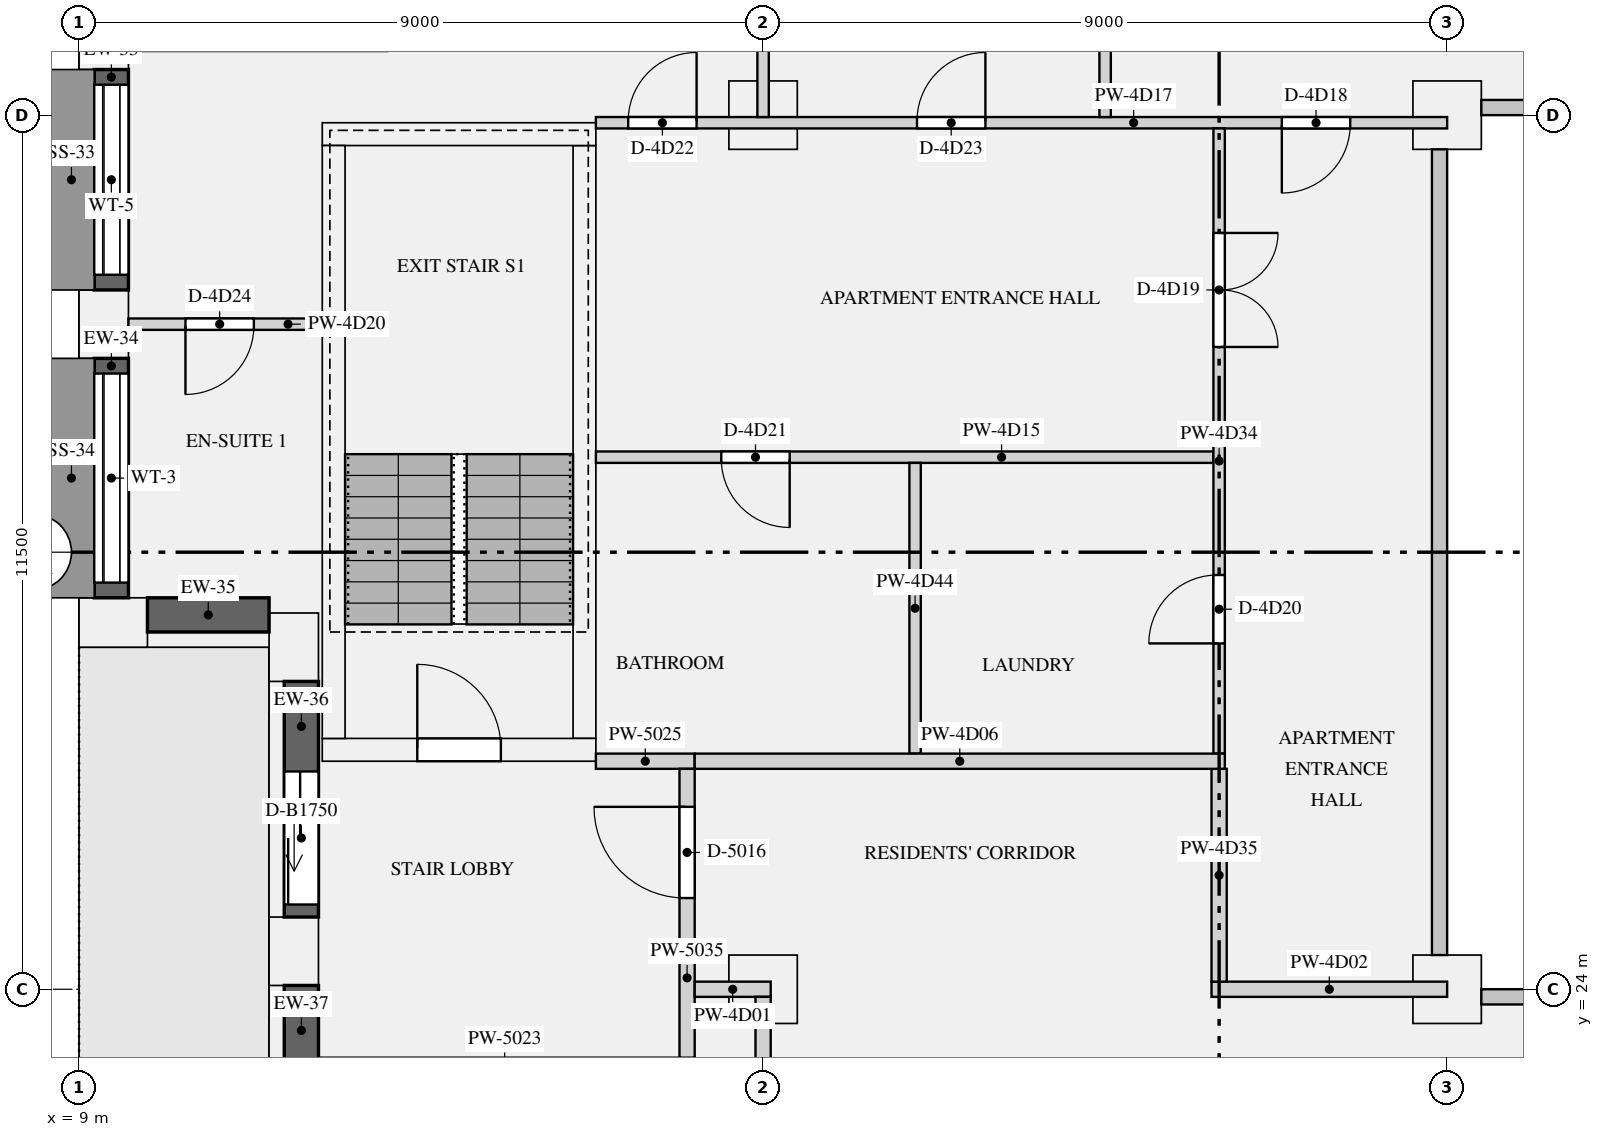
"""IFC4 building model, lengths in metres.
Left out: names, types, materials, properties, quantities, classifications, styles, units other than length and angle.
Written with IfcOpenShell. Run it as: python <this file> out.ifc"""

import sys

from ifc_helpers import new_model, si_unit, direction, frame, frame_2d, origin, origin_2d, place, context, subcontext, project, spatial, rectangle, extrude, element, fill, save


model = new_model("IFC4")
c1 = context("Model", 3, precision=1e-05, world=origin(), true_north=direction((0.0, 1.0)))
c2 = subcontext(c1, "Body", "Model", "MODEL_VIEW")
j1 = project(units=[si_unit("LENGTHUNIT", "METRE"), si_unit("PLANEANGLEUNIT", "RADIAN")], contexts=[c1])
p1 = place(None, origin())
s1 = spatial("IfcSite", under=j1, at=p1, CompositionType="ELEMENT")
p2 = place(p1, origin())
s2 = spatial("IfcBuilding", under=s1, at=p2, CompositionType="ELEMENT")
p3 = place(p2, frame((0.0, 0.0, 223.2)))
s3 = spatial("IfcBuildingStorey", under=s2, at=p3, CompositionType="ELEMENT", Elevation=223.2)
for number, where, z_axis, x_axis in (
    (1, (9.325, 36.55, 0.0), (0.0, 0.0, 1.0), (0.0, -1.0, 0.0)),
    (2, (9.325, 32.75, 0.0), (0.0, 0.0, 1.0), (0.0, -1.0, 0.0)),
    (3, (9.45, 28.825, 0.0), (0.0, 0.0, 1.0), (1.0, 0.0, 0.0)),
    (4, (11.825, 28.5, 0.0), (0.0, 0.0, 1.0), (0.0, -1.0, 0.0)),
    (5, (11.825, 24.5, 0.0), (0.0, 0.0, 1.0), (0.0, -1.0, 0.0)),
):
    element("IfcColumn", number, at=place(p3, frame(where, z_axis=z_axis, x_axis=x_axis)), inside=s3, PredefinedType="USERDEFINED", context=c2, shape_type="SweptSolid", body=[
        extrude(rectangle(XDim=0.9, YDim=0.65, at=origin_2d()), origin(), (0.0, 0.0, 1.0), 3.15),
    ])
for number, where, z_axis, x_axis in (
    (6, (18.0, 24.0, 0.0), (0.0, 0.0, 1.0), (1.0, 0.0, 0.0)),
    (7, (27.0, 24.0, 0.0), (0.0, 0.0, 1.0), (1.0, 0.0, 0.0)),
    (8, (18.0, 35.5, 0.0), (0.0, 0.0, 1.0), (1.0, 0.0, 0.0)),
    (9, (27.0, 35.5, 0.0), (0.0, 0.0, 1.0), (1.0, 0.0, 0.0)),
):
    element("IfcColumn", number, at=place(p3, frame(where, z_axis=z_axis, x_axis=x_axis)), inside=s3, PredefinedType="COLUMN", context=c2, shape_type="SweptSolid", body=[
        extrude(rectangle(XDim=0.9, YDim=0.9, at=origin_2d()), origin(), (0.0, 0.0, 1.0), 3.15),
    ])
p4 = place(p3, frame((12.2, 27.15, 0.0), z_axis=(0.0, 0.0, 1.0), x_axis=(1.0, 0.0, 0.0)))
e10 = element("IfcWall", 10, at=p4, inside=s3, PredefinedType="SHEAR", context=c2, shape_type="SweptSolid", body=[
    extrude(rectangle(XDim=3.6, YDim=0.3, at=frame_2d((1.8, 0.0))), origin(), (0.0, 0.0, 1.0), 3.15),
])
p5 = place(p4, frame((1.25, 0.0, 0.0)))
e11 = element("IfcOpeningElement", 11, at=p5, cuts=e10, PredefinedType="OPENING", context=c2, shape_type="SweptSolid", body=[
    extrude(rectangle(XDim=1.1, YDim=2.1, at=frame_2d((0.55, 1.05))), frame((0.0, 0.16, 0.0), z_axis=(0.0, -1.0, 0.0), x_axis=(1.0, 0.0, 0.0)), (0.0, 0.0, 1.0), 0.32),
])
p6 = place(p3, frame((12.2, 35.25, 0.0), z_axis=(0.0, 0.0, 1.0), x_axis=(1.0, 0.0, 0.0)))
e12 = element("IfcWall", 12, at=p6, inside=s3, PredefinedType="SHEAR", context=c2, shape_type="SweptSolid", body=[
    extrude(rectangle(XDim=3.6, YDim=0.3, at=frame_2d((1.8, 0.0))), origin(), (0.0, 0.0, 1.0), 3.15),
])
for number, where, z_axis, x_axis in (
    (13, (12.35, 27.3, 0.0), (0.0, 0.0, 1.0), (0.0, 1.0, 0.0)),
    (14, (15.65, 27.3, 0.0), (0.0, 0.0, 1.0), (0.0, 1.0, 0.0)),
):
    element("IfcWall", number, at=place(p3, frame(where, z_axis=z_axis, x_axis=x_axis)), inside=s3, PredefinedType="SHEAR", context=c2, shape_type="SweptSolid", body=[
        extrude(rectangle(XDim=7.8, YDim=0.3, at=frame_2d((3.9, 0.0))), origin(), (0.0, 0.0, 1.0), 3.15),
    ])
p7 = place(p3, frame((9.425, 36.1, 0.9), z_axis=(0.0, 0.0, 1.0), x_axis=(0.0, -1.0, 0.0)))
e15 = element("IfcWall", 15, at=p7, inside=s3, PredefinedType="SOLIDWALL", context=c2, shape_type="SweptSolid", body=[
    extrude(rectangle(XDim=2.9, YDim=0.45, at=frame_2d((1.45, 0.0))), origin(), (0.0, 0.0, 1.0), 1.93),
])
p8 = place(p7, frame((0.2, 0.0, 0.15)))
e16 = element("IfcOpeningElement", 16, at=p8, cuts=e15, PredefinedType="OPENING", context=c2, shape_type="SweptSolid", body=[
    extrude(rectangle(XDim=2.5, YDim=1.5, at=frame_2d((1.25, 0.75))), frame((0.0, 0.235, 0.0), z_axis=(0.0, -1.0, 0.0), x_axis=(1.0, 0.0, 0.0)), (0.0, 0.0, 1.0), 0.47),
])
p9 = place(p3, frame((9.425, 32.3, 0.9), z_axis=(0.0, 0.0, 1.0), x_axis=(0.0, -1.0, 0.0)))
e17 = element("IfcWall", 17, at=p9, inside=s3, PredefinedType="SOLIDWALL", context=c2, shape_type="SweptSolid", body=[
    extrude(rectangle(XDim=3.15, YDim=0.45, at=frame_2d((1.575, 0.0))), origin(), (0.0, 0.0, 1.0), 1.93),
])
p10 = place(p9, frame((0.2, 0.0, 0.15)))
e18 = element("IfcOpeningElement", 18, at=p10, cuts=e17, PredefinedType="OPENING", context=c2, shape_type="SweptSolid", body=[
    extrude(rectangle(XDim=2.75, YDim=1.5, at=frame_2d((1.375, 0.75))), frame((0.0, 0.235, 0.0), z_axis=(0.0, -1.0, 0.0), x_axis=(1.0, 0.0, 0.0)), (0.0, 0.0, 1.0), 0.47),
])
p11 = place(p3, frame((9.9, 28.925, 0.9), z_axis=(0.0, 0.0, 1.0), x_axis=(1.0, 0.0, 0.0)))
e19 = element("IfcWall", 19, at=p11, inside=s3, PredefinedType="SOLIDWALL", context=c2, shape_type="SweptSolid", body=[
    extrude(rectangle(XDim=1.6, YDim=0.45, at=frame_2d((0.8, 0.0))), origin(), (0.0, 0.0, 1.0), 1.93),
])
p12 = place(p3, frame((11.925, 28.05, 0.0), z_axis=(0.0, 0.0, 1.0), x_axis=(0.0, -1.0, 0.0)))
e20 = element("IfcWall", 20, at=p12, inside=s3, PredefinedType="SOLIDWALL", context=c2, shape_type="SweptSolid", body=[
    extrude(rectangle(XDim=3.1, YDim=0.45, at=frame_2d((1.55, 0.0))), origin(), (0.0, 0.0, 1.0), 2.83),
])
p13 = place(p12, frame((1.185, 0.0, 0.0)))
e21 = element("IfcOpeningElement", 21, at=p13, cuts=e20, PredefinedType="OPENING", context=c2, shape_type="SweptSolid", body=[
    extrude(rectangle(XDim=1.75, YDim=2.3, at=frame_2d((0.875, 1.15))), frame((0.0, 0.235, 0.0), z_axis=(0.0, -1.0, 0.0), x_axis=(1.0, 0.0, 0.0)), (0.0, 0.0, 1.0), 0.47),
])
p14 = place(p3, frame((11.925, 24.05, 0.0), z_axis=(0.0, 0.0, 1.0), x_axis=(0.0, -1.0, 0.0)))
e22 = element("IfcWall", 22, at=p14, inside=s3, PredefinedType="SOLIDWALL", context=c2, shape_type="SweptSolid", body=[
    extrude(rectangle(XDim=3.1, YDim=0.45, at=frame_2d((1.55, 0.0))), origin(), (0.0, 0.0, 1.0), 2.83),
])
p15 = place(p14, frame((1.185, 0.0, 0.0)))
e23 = element("IfcOpeningElement", 23, at=p15, cuts=e22, PredefinedType="OPENING", context=c2, shape_type="SweptSolid", body=[
    extrude(rectangle(XDim=1.75, YDim=2.3, at=frame_2d((0.875, 1.15))), frame((0.0, 0.235, 0.0), z_axis=(0.0, -1.0, 0.0), x_axis=(1.0, 0.0, 0.0)), (0.0, 0.0, 1.0), 0.47),
])
p16 = place(p3, frame((15.8, 27.0, 0.0), z_axis=(0.0, 0.0, 1.0), x_axis=(1.0, 0.0, 0.0)))
e24 = element("IfcWall", 24, at=p16, inside=s3, PredefinedType="PARTITIONING", context=c2, shape_type="SweptSolid", body=[
    extrude(rectangle(XDim=1.3, YDim=0.2, at=frame_2d((0.65, 0.0))), origin(), (0.0, 0.0, 1.0), 2.83),
])
p17 = place(p3, frame((17.0, 23.1, 0.0), z_axis=(0.0, 0.0, 1.0), x_axis=(0.0, 1.0, 0.0)))
e25 = element("IfcWall", 25, at=p17, inside=s3, PredefinedType="PARTITIONING", context=c2, shape_type="SweptSolid", body=[
    extrude(rectangle(XDim=3.8, YDim=0.2, at=frame_2d((1.9, 0.0))), origin(), (0.0, 0.0, 1.0), 2.83),
])
p18 = place(p17, frame((2.1, 0.0, 0.0)))
e26 = element("IfcOpeningElement", 26, at=p18, cuts=e25, PredefinedType="OPENING", context=c2, shape_type="SweptSolid", body=[
    extrude(rectangle(XDim=1.2, YDim=2.1, at=frame_2d((0.6, 1.05))), frame((0.0, 0.11, 0.0), z_axis=(0.0, -1.0, 0.0), x_axis=(1.0, 0.0, 0.0)), (0.0, 0.0, 1.0), 0.22),
])
p19 = place(p3, frame((17.1, 24.0, 0.0), z_axis=(0.0, 0.0, 1.0), x_axis=(1.0, 0.0, 0.0)))
e27 = element("IfcWall", 27, at=p19, inside=s3, PredefinedType="PARTITIONING", context=c2, shape_type="SweptSolid", body=[
    extrude(rectangle(XDim=1.0, YDim=0.2, at=frame_2d((0.5, 0.0))), origin(), (0.0, 0.0, 1.0), 2.83),
])
p20 = place(p3, frame((23.9, 24.0, 0.0), z_axis=(0.0, 0.0, 1.0), x_axis=(1.0, 0.0, 0.0)))
e28 = element("IfcWall", 28, at=p20, inside=s3, PredefinedType="PARTITIONING", context=c2, shape_type="SweptSolid", body=[
    extrude(rectangle(XDim=3.1, YDim=0.2, at=frame_2d((1.55, 0.0))), origin(), (0.0, 0.0, 1.0), 2.83),
])
p21 = place(p3, frame((17.1, 27.0, 0.0), z_axis=(0.0, 0.0, 1.0), x_axis=(1.0, 0.0, 0.0)))
e29 = element("IfcWall", 29, at=p21, inside=s3, PredefinedType="PARTITIONING", context=c2, shape_type="SweptSolid", body=[
    extrude(rectangle(XDim=6.975, YDim=0.2, at=frame_2d((3.487, 0.0))), origin(), (0.0, 0.0, 1.0), 2.83),
])
p22 = place(p3, frame((15.8, 31.0, 0.0), z_axis=(0.0, 0.0, 1.0), x_axis=(1.0, 0.0, 0.0)))
e30 = element("IfcWall", 30, at=p22, inside=s3, PredefinedType="PARTITIONING", context=c2, shape_type="SweptSolid", body=[
    extrude(rectangle(XDim=8.125, YDim=0.15, at=frame_2d((4.062, 0.0))), origin(), (0.0, 0.0, 1.0), 2.83),
])
p23 = place(p22, frame((1.65, 0.0, 0.0)))
e31 = element("IfcOpeningElement", 31, at=p23, cuts=e30, PredefinedType="OPENING", context=c2, shape_type="SweptSolid", body=[
    extrude(rectangle(XDim=0.9, YDim=2.1, at=frame_2d((0.45, 1.05))), frame((0.0, 0.085, 0.0), z_axis=(0.0, -1.0, 0.0), x_axis=(1.0, 0.0, 0.0)), (0.0, 0.0, 1.0), 0.17),
])
p24 = place(p3, frame((15.8, 35.4, 0.0), z_axis=(0.0, 0.0, 1.0), x_axis=(1.0, 0.0, 0.0)))
e32 = element("IfcWall", 32, at=p24, inside=s3, PredefinedType="PARTITIONING", context=c2, shape_type="SweptSolid", body=[
    extrude(rectangle(XDim=11.2, YDim=0.15, at=frame_2d((5.6, 0.0))), origin(), (0.0, 0.0, 1.0), 2.83),
])
p25 = place(p24, frame((9.025, 0.0, 0.0)))
e33 = element("IfcOpeningElement", 33, at=p25, cuts=e32, PredefinedType="OPENING", context=c2, shape_type="SweptSolid", body=[
    extrude(rectangle(XDim=0.9, YDim=2.1, at=frame_2d((0.45, 1.05))), frame((0.0, 0.085, 0.0), z_axis=(0.0, -1.0, 0.0), x_axis=(1.0, 0.0, 0.0)), (0.0, 0.0, 1.0), 0.17),
])
p26 = place(p24, frame((0.425, 0.0, 0.0)))
e34 = element("IfcOpeningElement", 34, at=p26, cuts=e32, PredefinedType="OPENING", context=c2, shape_type="SweptSolid", body=[
    extrude(rectangle(XDim=0.9, YDim=2.1, at=frame_2d((0.45, 1.05))), frame((0.0, 0.085, 0.0), z_axis=(0.0, -1.0, 0.0), x_axis=(1.0, 0.0, 0.0)), (0.0, 0.0, 1.0), 0.17),
])
p27 = place(p24, frame((4.225, 0.0, 0.0)))
e35 = element("IfcOpeningElement", 35, at=p27, cuts=e32, PredefinedType="OPENING", context=c2, shape_type="SweptSolid", body=[
    extrude(rectangle(XDim=0.9, YDim=2.1, at=frame_2d((0.45, 1.05))), frame((0.0, 0.085, 0.0), z_axis=(0.0, -1.0, 0.0), x_axis=(1.0, 0.0, 0.0)), (0.0, 0.0, 1.0), 0.17),
])
p28 = place(p3, frame((9.65, 32.75, 0.0), z_axis=(0.0, 0.0, 1.0), x_axis=(1.0, 0.0, 0.0)))
e36 = element("IfcWall", 36, at=p28, inside=s3, PredefinedType="PARTITIONING", context=c2, shape_type="SweptSolid", body=[
    extrude(rectangle(XDim=2.55, YDim=0.15, at=frame_2d((1.275, 0.0))), origin(), (0.0, 0.0, 1.0), 2.83),
])
p29 = place(p28, frame((0.75, 0.0, 0.0)))
e37 = element("IfcOpeningElement", 37, at=p29, cuts=e36, PredefinedType="OPENING", context=c2, shape_type="SweptSolid", body=[
    extrude(rectangle(XDim=0.9, YDim=2.1, at=frame_2d((0.45, 1.05))), frame((0.0, 0.085, 0.0), z_axis=(0.0, -1.0, 0.0), x_axis=(1.0, 0.0, 0.0)), (0.0, 0.0, 1.0), 0.17),
])
p30 = place(p3, frame((18.0, 35.475, 0.0), z_axis=(0.0, 0.0, 1.0), x_axis=(0.0, 1.0, 0.0)))
e38 = element("IfcWall", 38, at=p30, inside=s3, PredefinedType="PARTITIONING", context=c2, shape_type="SweptSolid", body=[
    extrude(rectangle(XDim=5.375, YDim=0.15, at=frame_2d((2.688, 0.0))), origin(), (0.0, 0.0, 1.0), 2.83),
])
p31 = place(p3, frame((18.0, 16.1, 0.0), z_axis=(0.0, 0.0, 1.0), x_axis=(0.0, 1.0, 0.0)))
e39 = element("IfcWall", 39, at=p31, inside=s3, PredefinedType="PARTITIONING", context=c2, shape_type="SweptSolid", body=[
    extrude(rectangle(XDim=7.8, YDim=0.2, at=frame_2d((3.9, 0.0))), origin(), (0.0, 0.0, 1.0), 2.83),
])
p32 = place(p31, frame((1.85, 0.0, 0.0)))
e40 = element("IfcOpeningElement", 40, at=p32, cuts=e39, PredefinedType="OPENING", context=c2, shape_type="SweptSolid", body=[
    extrude(rectangle(XDim=1.1, YDim=2.1, at=frame_2d((0.55, 1.05))), frame((0.0, 0.11, 0.0), z_axis=(0.0, -1.0, 0.0), x_axis=(1.0, 0.0, 0.0)), (0.0, 0.0, 1.0), 0.22),
])
p33 = place(p3, frame((24.0, 27.1, 0.0), z_axis=(0.0, 0.0, 1.0), x_axis=(0.0, 1.0, 0.0)))
e41 = element("IfcWall", 41, at=p33, inside=s3, PredefinedType="PARTITIONING", context=c2, shape_type="SweptSolid", body=[
    extrude(rectangle(XDim=8.225, YDim=0.15, at=frame_2d((4.112, 0.0))), origin(), (0.0, 0.0, 1.0), 2.83),
])
p34 = place(p33, frame((5.35, 0.0, 0.0)))
e42 = element("IfcOpeningElement", 42, at=p34, cuts=e41, PredefinedType="OPENING", context=c2, shape_type="SweptSolid", body=[
    extrude(rectangle(XDim=1.5, YDim=2.1, at=frame_2d((0.75, 1.05))), frame((0.0, 0.085, 0.0), z_axis=(0.0, -1.0, 0.0), x_axis=(1.0, 0.0, 0.0)), (0.0, 0.0, 1.0), 0.17),
])
p35 = place(p33, frame((1.45, 0.0, 0.0)))
e43 = element("IfcOpeningElement", 43, at=p35, cuts=e41, PredefinedType="OPENING", context=c2, shape_type="SweptSolid", body=[
    extrude(rectangle(XDim=0.9, YDim=2.1, at=frame_2d((0.45, 1.05))), frame((0.0, 0.085, 0.0), z_axis=(0.0, -1.0, 0.0), x_axis=(1.0, 0.0, 0.0)), (0.0, 0.0, 1.0), 0.17),
])
p36 = place(p3, frame((24.0, 24.1, 0.0), z_axis=(0.0, 0.0, 1.0), x_axis=(0.0, 1.0, 0.0)))
e44 = element("IfcWall", 44, at=p36, inside=s3, PredefinedType="PARTITIONING", context=c2, shape_type="SweptSolid", body=[
    extrude(rectangle(XDim=2.8, YDim=0.2, at=frame_2d((1.4, 0.0))), origin(), (0.0, 0.0, 1.0), 2.83),
])
p37 = place(p3, frame((22.5, 35.475, 0.0), z_axis=(0.0, 0.0, 1.0), x_axis=(0.0, 1.0, 0.0)))
e45 = element("IfcWall", 45, at=p37, inside=s3, PredefinedType="PARTITIONING", context=c2, shape_type="SweptSolid", body=[
    extrude(rectangle(XDim=5.375, YDim=0.15, at=frame_2d((2.688, 0.0))), origin(), (0.0, 0.0, 1.0), 2.83),
])
p38 = place(p3, frame((20.0, 27.1, 0.0), z_axis=(0.0, 0.0, 1.0), x_axis=(0.0, 1.0, 0.0)))
e46 = element("IfcWall", 46, at=p38, inside=s3, PredefinedType="PARTITIONING", context=c2, shape_type="SweptSolid", body=[
    extrude(rectangle(XDim=3.825, YDim=0.15, at=frame_2d((1.913, 0.0))), origin(), (0.0, 0.0, 1.0), 2.83),
])
p39 = place(p8, origin())
e47 = element("IfcWindow", 47, at=p39, inside=s3, PartitioningType="SINGLE_PANEL", PredefinedType="WINDOW", context=c2, shape_type="SweptSolid", body=[
    extrude(rectangle(XDim=2.5, YDim=1.5, at=frame_2d((1.25, 0.75))), frame((0.0, -0.065, 0.0), z_axis=(0.0, -1.0, 0.0), x_axis=(1.0, 0.0, 0.0)), (0.0, 0.0, 1.0), 0.06),
])
fill(e16, e47)
p40 = place(p10, origin())
e48 = element("IfcWindow", 48, at=p40, inside=s3, PartitioningType="SINGLE_PANEL", PredefinedType="WINDOW", context=c2, shape_type="SweptSolid", body=[
    extrude(rectangle(XDim=2.75, YDim=1.5, at=frame_2d((1.375, 0.75))), frame((0.0, -0.065, 0.0), z_axis=(0.0, -1.0, 0.0), x_axis=(1.0, 0.0, 0.0)), (0.0, 0.0, 1.0), 0.06),
])
fill(e18, e48)
p41 = place(p13, frame((1.75, -0.19, 0.0), z_axis=(0.0, 0.0, 1.0), x_axis=(-1.0, 0.0, 0.0)))
e49 = element("IfcDoor", 49, at=p41, inside=s3, OperationType="SLIDING_TO_LEFT", PredefinedType="DOOR", context=c2, shape_type="SweptSolid", body=[
    extrude(rectangle(XDim=1.75, YDim=2.3, at=frame_2d((0.875, 1.15))), frame((0.0, -0.07, 0.0), z_axis=(0.0, -1.0, 0.0), x_axis=(1.0, 0.0, 0.0)), (0.0, 0.0, 1.0), 0.05),
])
fill(e21, e49)
p42 = place(p5, origin())
e50 = element("IfcDoor", 50, at=p42, inside=s3, OperationType="SINGLE_SWING_LEFT", PredefinedType="DOOR", context=c2, shape_type="SweptSolid", body=[
    extrude(rectangle(XDim=1.1, YDim=2.1, at=frame_2d((0.55, 1.05))), frame((0.0, 0.025, 0.0), z_axis=(0.0, -1.0, 0.0), x_axis=(1.0, 0.0, 0.0)), (0.0, 0.0, 1.0), 0.05),
])
fill(e11, e50)
p43 = place(p18, origin())
e51 = element("IfcDoor", 51, at=p43, inside=s3, OperationType="SINGLE_SWING_RIGHT", PredefinedType="DOOR", context=c2, shape_type="SweptSolid", body=[
    extrude(rectangle(XDim=1.2, YDim=2.1, at=frame_2d((0.6, 1.05))), frame((0.0, 0.025, 0.0), z_axis=(0.0, -1.0, 0.0), x_axis=(1.0, 0.0, 0.0)), (0.0, 0.0, 1.0), 0.05),
])
fill(e26, e51)
p44 = place(p25, frame((0.9, 0.0, 0.0), z_axis=(0.0, 0.0, 1.0), x_axis=(-1.0, 0.0, 0.0)))
e52 = element("IfcDoor", 52, at=p44, inside=s3, OperationType="SINGLE_SWING_RIGHT", PredefinedType="DOOR", context=c2, shape_type="SweptSolid", body=[
    extrude(rectangle(XDim=0.9, YDim=2.1, at=frame_2d((0.45, 1.05))), frame((0.0, 0.025, 0.0), z_axis=(0.0, -1.0, 0.0), x_axis=(1.0, 0.0, 0.0)), (0.0, 0.0, 1.0), 0.05),
])
fill(e33, e52)
p45 = place(p34, frame((1.5, 0.0, 0.0), z_axis=(0.0, 0.0, 1.0), x_axis=(-1.0, 0.0, 0.0)))
e53 = element("IfcDoor", 53, at=p45, inside=s3, OperationType="DOUBLE_DOOR_SINGLE_SWING", PredefinedType="DOOR", context=c2, shape_type="SweptSolid", body=[
    extrude(rectangle(XDim=1.5, YDim=2.1, at=frame_2d((0.75, 1.05))), frame((0.0, 0.025, 0.0), z_axis=(0.0, -1.0, 0.0), x_axis=(1.0, 0.0, 0.0)), (0.0, 0.0, 1.0), 0.05),
])
fill(e42, e53)
p46 = place(p35, origin())
e54 = element("IfcDoor", 54, at=p46, inside=s3, OperationType="SINGLE_SWING_LEFT", PredefinedType="DOOR", context=c2, shape_type="SweptSolid", body=[
    extrude(rectangle(XDim=0.9, YDim=2.1, at=frame_2d((0.45, 1.05))), frame((0.0, 0.025, 0.0), z_axis=(0.0, -1.0, 0.0), x_axis=(1.0, 0.0, 0.0)), (0.0, 0.0, 1.0), 0.05),
])
fill(e43, e54)
p47 = place(p23, frame((0.9, 0.0, 0.0), z_axis=(0.0, 0.0, 1.0), x_axis=(-1.0, 0.0, 0.0)))
e55 = element("IfcDoor", 55, at=p47, inside=s3, OperationType="SINGLE_SWING_LEFT", PredefinedType="DOOR", context=c2, shape_type="SweptSolid", body=[
    extrude(rectangle(XDim=0.9, YDim=2.1, at=frame_2d((0.45, 1.05))), frame((0.0, 0.025, 0.0), z_axis=(0.0, -1.0, 0.0), x_axis=(1.0, 0.0, 0.0)), (0.0, 0.0, 1.0), 0.05),
])
fill(e31, e55)
p48 = place(p26, origin())
e56 = element("IfcDoor", 56, at=p48, inside=s3, OperationType="SINGLE_SWING_RIGHT", PredefinedType="DOOR", context=c2, shape_type="SweptSolid", body=[
    extrude(rectangle(XDim=0.9, YDim=2.1, at=frame_2d((0.45, 1.05))), frame((0.0, 0.025, 0.0), z_axis=(0.0, -1.0, 0.0), x_axis=(1.0, 0.0, 0.0)), (0.0, 0.0, 1.0), 0.05),
])
fill(e34, e56)
p49 = place(p27, origin())
e57 = element("IfcDoor", 57, at=p49, inside=s3, OperationType="SINGLE_SWING_RIGHT", PredefinedType="DOOR", context=c2, shape_type="SweptSolid", body=[
    extrude(rectangle(XDim=0.9, YDim=2.1, at=frame_2d((0.45, 1.05))), frame((0.0, 0.025, 0.0), z_axis=(0.0, -1.0, 0.0), x_axis=(1.0, 0.0, 0.0)), (0.0, 0.0, 1.0), 0.05),
])
fill(e35, e57)
p50 = place(p29, frame((0.9, 0.0, 0.0), z_axis=(0.0, 0.0, 1.0), x_axis=(-1.0, 0.0, 0.0)))
e58 = element("IfcDoor", 58, at=p50, inside=s3, OperationType="SINGLE_SWING_RIGHT", PredefinedType="DOOR", context=c2, shape_type="SweptSolid", body=[
    extrude(rectangle(XDim=0.9, YDim=2.1, at=frame_2d((0.45, 1.05))), frame((0.0, 0.025, 0.0), z_axis=(0.0, -1.0, 0.0), x_axis=(1.0, 0.0, 0.0)), (0.0, 0.0, 1.0), 0.05),
])
fill(e37, e58)
save(model, sys.argv[1])
